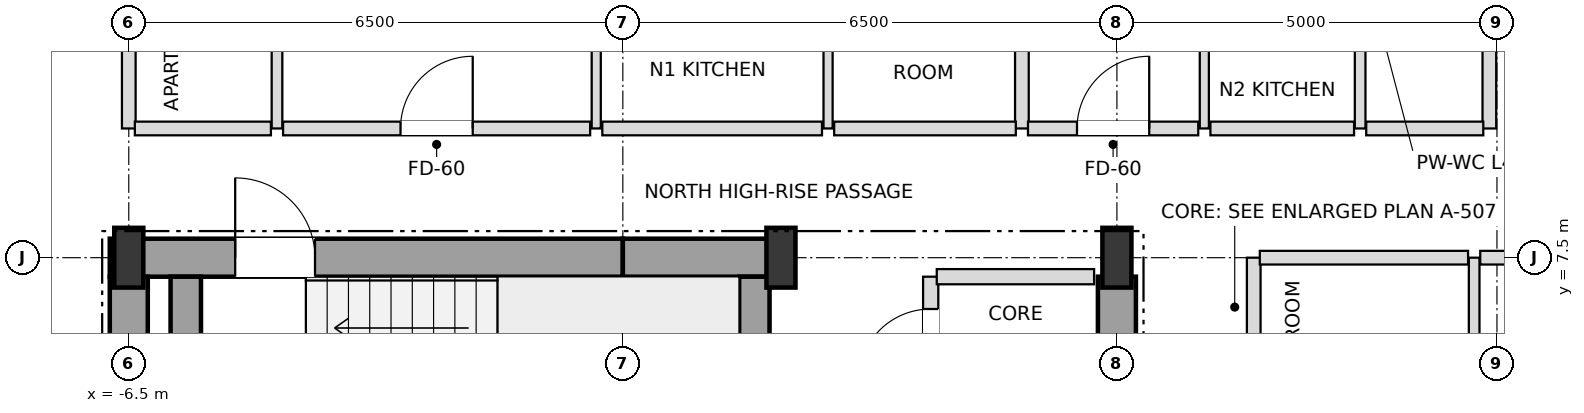
"""IFC4 building model, lengths in metres.
Left out: names, types, materials, properties, quantities, classifications, styles, units other than length and angle.
Written with IfcOpenShell. Run it as: python <this file> out.ifc"""

import sys

from ifc_helpers import new_model, si_unit, direction, frame, frame_2d, origin, origin_2d, place, context, subcontext, project, spatial, rectangle, i_section, extrude, element, fill, save


model = new_model("IFC4")
c1 = context("Model", 3, precision=1e-05, world=origin(), true_north=direction((0.0, 1.0)))
c2 = subcontext(c1, "Body", "Model", "MODEL_VIEW")
j1 = project(units=[si_unit("LENGTHUNIT", "METRE"), si_unit("PLANEANGLEUNIT", "RADIAN")], contexts=[c1])
p1 = place(None, origin())
s1 = spatial("IfcSite", under=j1, at=p1, CompositionType="ELEMENT")
p2 = place(p1, origin())
s2 = spatial("IfcBuilding", under=s1, at=p2, CompositionType="ELEMENT")
p3 = place(p2, frame((0.0, 0.0, 279.9)))
s3 = spatial("IfcBuildingStorey", under=s2, at=p3, CompositionType="ELEMENT", Elevation=279.9)
for number, where, z_axis, x_axis in (
    (1, (-6.5, 7.5, 0.0), (0.0, 0.0, 1.0), (1.0, 0.0, 0.0)),
    (2, (2.08, 7.5, 0.0), (0.0, 0.0, 1.0), (1.0, 0.0, 0.0)),
    (3, (6.5, 7.5, 0.0), (0.0, 0.0, 1.0), (1.0, 0.0, 0.0)),
):
    element("IfcColumn", number, at=place(p3, frame(where, z_axis=z_axis, x_axis=x_axis)), inside=s3, PredefinedType="COLUMN", context=c2, shape_type="SweptSolid", body=[
        extrude(i_section(OverallWidth=0.382, OverallDepth=0.786, WebThickness=0.02, FlangeThickness=0.033, at=origin_2d()), origin(), (0.0, 0.0, 1.0), 3.6),
    ])
p4 = place(p3, frame((-6.75, 7.5, 0.0), z_axis=(0.0, 0.0, 1.0), x_axis=(1.0, 0.0, 0.0)))
e4 = element("IfcWall", 4, at=p4, inside=s3, PredefinedType="SHEAR", context=c2, shape_type="SweptSolid", body=[
    extrude(rectangle(XDim=6.75, YDim=0.5, at=frame_2d((3.375, 0.0))), origin(), (0.0, 0.0, 1.0), 3.38),
])
p5 = place(p4, frame((1.65, 0.0, 0.0)))
e5 = element("IfcOpeningElement", 5, at=p5, cuts=e4, PredefinedType="OPENING", context=c2, shape_type="SweptSolid", body=[
    extrude(rectangle(XDim=1.05, YDim=2.15, at=frame_2d((0.525, 1.075))), frame((0.0, 0.26, 0.0), z_axis=(0.0, -1.0, 0.0), x_axis=(1.0, 0.0, 0.0)), (0.0, 0.0, 1.0), 0.52),
])
p6 = place(p3, frame((0.0, 7.5, 0.0), z_axis=(0.0, 0.0, 1.0), x_axis=(1.0, 0.0, 0.0)))
e6 = element("IfcWall", 6, at=p6, inside=s3, PredefinedType="SHEAR", context=c2, shape_type="SweptSolid", body=[
    extrude(rectangle(XDim=2.08, YDim=0.5, at=frame_2d((1.04, 0.0))), origin(), (0.0, 0.0, 1.0), 3.38),
])
for number, where, z_axis, x_axis in (
    (7, (-6.5, 3.95, 0.0), (0.0, 0.0, 1.0), (0.0, 1.0, 0.0)),
    (8, (6.5, 3.95, 0.0), (0.0, 0.0, 1.0), (0.0, 1.0, 0.0)),
):
    element("IfcWall", number, at=place(p3, frame(where, z_axis=z_axis, x_axis=x_axis)), inside=s3, PredefinedType="SHEAR", context=c2, shape_type="SweptSolid", body=[
        extrude(rectangle(XDim=3.3, YDim=0.5, at=frame_2d((1.65, 0.0))), origin(), (0.0, 0.0, 1.0), 3.38),
    ])
for number, where, z_axis, x_axis in (
    (9, (1.73, 3.95, 0.0), (0.0, 0.0, 1.0), (0.0, 1.0, 0.0)),
    (10, (-5.75, 3.95, 0.0), (0.0, 0.0, 1.0), (0.0, 1.0, 0.0)),
):
    element("IfcWall", number, at=place(p3, frame(where, z_axis=z_axis, x_axis=x_axis)), inside=s3, PredefinedType="SHEAR", context=c2, shape_type="SweptSolid", body=[
        extrude(rectangle(XDim=3.3, YDim=0.4, at=frame_2d((1.65, 0.0))), origin(), (0.0, 0.0, 1.0), 3.38),
    ])
p7 = place(p3, frame((-6.5, 9.2, 0.0), z_axis=(0.0, 0.0, 1.0), x_axis=(0.0, 1.0, 0.0)))
e11 = element("IfcWall", 11, at=p7, inside=s3, PredefinedType="PARTITIONING", context=c2, shape_type="SweptSolid", body=[
    extrude(rectangle(XDim=10.7, YDim=0.18, at=frame_2d((5.35, 0.0))), origin(), (0.0, 0.0, 1.0), 2.826),
])
p8 = place(p3, frame((-4.55, 9.2, 0.0), z_axis=(0.0, 0.0, 1.0), x_axis=(0.0, 1.0, 0.0)))
e12 = element("IfcWall", 12, at=p8, inside=s3, PredefinedType="PARTITIONING", context=c2, shape_type="SweptSolid", body=[
    extrude(rectangle(XDim=4.7, YDim=0.14, at=frame_2d((2.35, 0.0))), origin(), (0.0, 0.0, 1.0), 3.38),
])
p9 = place(p8, frame((1.9, 0.0, 0.0)))
e13 = element("IfcOpeningElement", 13, at=p9, cuts=e12, PredefinedType="OPENING", context=c2, shape_type="SweptSolid", body=[
    extrude(rectangle(XDim=0.9, YDim=2.1, at=frame_2d((0.45, 1.05))), frame((0.0, 0.08, 0.0), z_axis=(0.0, -1.0, 0.0), x_axis=(1.0, 0.0, 0.0)), (0.0, 0.0, 1.0), 0.16),
])
p10 = place(p3, frame((-0.35, 9.2, 0.0), z_axis=(0.0, 0.0, 1.0), x_axis=(0.0, 1.0, 0.0)))
e14 = element("IfcWall", 14, at=p10, inside=s3, PredefinedType="PARTITIONING", context=c2, shape_type="SweptSolid", body=[
    extrude(rectangle(XDim=4.7, YDim=0.12, at=frame_2d((2.35, 0.0))), origin(), (0.0, 0.0, 1.0), 3.38),
])
p11 = place(p10, frame((1.875, 0.0, 0.0)))
e15 = element("IfcOpeningElement", 15, at=p11, cuts=e14, PredefinedType="OPENING", context=c2, shape_type="SweptSolid", body=[
    extrude(rectangle(XDim=0.95, YDim=2.1, at=frame_2d((0.475, 1.05))), frame((0.0, 0.07, 0.0), z_axis=(0.0, -1.0, 0.0), x_axis=(1.0, 0.0, 0.0)), (0.0, 0.0, 1.0), 0.14),
])
p12 = place(p3, frame((2.7, 9.2, 0.0), z_axis=(0.0, 0.0, 1.0), x_axis=(0.0, 1.0, 0.0)))
e16 = element("IfcWall", 16, at=p12, inside=s3, PredefinedType="PARTITIONING", context=c2, shape_type="SweptSolid", body=[
    extrude(rectangle(XDim=4.7, YDim=0.12, at=frame_2d((2.35, 0.0))), origin(), (0.0, 0.0, 1.0), 3.38),
])
p13 = place(p12, frame((1.9, 0.0, 0.0)))
e17 = element("IfcOpeningElement", 17, at=p13, cuts=e16, PredefinedType="OPENING", context=c2, shape_type="SweptSolid", body=[
    extrude(rectangle(XDim=0.9, YDim=2.1, at=frame_2d((0.45, 1.05))), frame((0.0, 0.07, 0.0), z_axis=(0.0, -1.0, 0.0), x_axis=(1.0, 0.0, 0.0)), (0.0, 0.0, 1.0), 0.14),
])
p14 = place(p3, frame((4.05, 5.55, 0.0), z_axis=(0.0, 0.0, 1.0), x_axis=(0.0, 1.0, 0.0)))
e18 = element("IfcWall", 18, at=p14, inside=s3, PredefinedType="SOLIDWALL", context=c2, shape_type="SweptSolid", body=[
    extrude(rectangle(XDim=1.7, YDim=0.2, at=frame_2d((0.85, 0.0))), origin(), (0.0, 0.0, 1.0), 3.38),
])
p15 = place(p14, frame((0.325, 0.0, 0.0)))
e19 = element("IfcOpeningElement", 19, at=p15, cuts=e18, PredefinedType="OPENING", context=c2, shape_type="SweptSolid", body=[
    extrude(rectangle(XDim=0.95, YDim=2.15, at=frame_2d((0.475, 1.075))), frame((0.0, 0.11, 0.0), z_axis=(0.0, -1.0, 0.0), x_axis=(1.0, 0.0, 0.0)), (0.0, 0.0, 1.0), 0.22),
])
p16 = place(p3, frame((5.25, 9.2, 0.0), z_axis=(0.0, 0.0, 1.0), x_axis=(0.0, 1.0, 0.0)))
e20 = element("IfcWall", 20, at=p16, inside=s3, PredefinedType="PARTITIONING", context=c2, shape_type="SweptSolid", body=[
    extrude(rectangle(XDim=10.7, YDim=0.18, at=frame_2d((5.35, 0.0))), origin(), (0.0, 0.0, 1.0), 3.018),
])
p17 = place(p3, frame((7.65, 9.2, 0.0), z_axis=(0.0, 0.0, 1.0), x_axis=(0.0, 1.0, 0.0)))
e21 = element("IfcWall", 21, at=p17, inside=s3, PredefinedType="PARTITIONING", context=c2, shape_type="SweptSolid", body=[
    extrude(rectangle(XDim=4.7, YDim=0.12, at=frame_2d((2.35, 0.0))), origin(), (0.0, 0.0, 1.0), 2.826),
])
p18 = place(p17, frame((1.875, 0.0, 0.0)))
e22 = element("IfcOpeningElement", 22, at=p18, cuts=e21, PredefinedType="OPENING", context=c2, shape_type="SweptSolid", body=[
    extrude(rectangle(XDim=0.95, YDim=2.1, at=frame_2d((0.475, 1.05))), frame((0.0, 0.07, 0.0), z_axis=(0.0, -1.0, 0.0), x_axis=(1.0, 0.0, 0.0)), (0.0, 0.0, 1.0), 0.14),
])
p19 = place(p3, frame((8.3, -7.5, 0.0), z_axis=(0.0, 0.0, 1.0), x_axis=(0.0, 1.0, 0.0)))
e23 = element("IfcWall", 23, at=p19, inside=s3, PredefinedType="PARTITIONING", context=c2, shape_type="SweptSolid", body=[
    extrude(rectangle(XDim=15.0, YDim=0.18, at=frame_2d((7.5, 0.0))), origin(), (0.0, 0.0, 1.0), 3.38),
])
p20 = place(p19, frame((2.355, 0.0, 0.0)))
e24 = element("IfcOpeningElement", 24, at=p20, cuts=e23, PredefinedType="OPENING", context=c2, shape_type="SweptSolid", body=[
    extrude(rectangle(XDim=0.95, YDim=2.15, at=frame_2d((0.475, 1.075))), frame((0.0, 0.1, 0.0), z_axis=(0.0, -1.0, 0.0), x_axis=(1.0, 0.0, 0.0)), (0.0, 0.0, 1.0), 0.2),
])
p21 = place(p3, frame((9.7, 9.2, 0.0), z_axis=(0.0, 0.0, 1.0), x_axis=(0.0, 1.0, 0.0)))
e25 = element("IfcWall", 25, at=p21, inside=s3, PredefinedType="PARTITIONING", context=c2, shape_type="SweptSolid", body=[
    extrude(rectangle(XDim=4.7, YDim=0.14, at=frame_2d((2.35, 0.0))), origin(), (0.0, 0.0, 1.0), 2.826),
])
p22 = place(p21, frame((1.9, 0.0, 0.0)))
e26 = element("IfcOpeningElement", 26, at=p22, cuts=e25, PredefinedType="OPENING", context=c2, shape_type="SweptSolid", body=[
    extrude(rectangle(XDim=0.9, YDim=2.1, at=frame_2d((0.45, 1.05))), frame((0.0, 0.08, 0.0), z_axis=(0.0, -1.0, 0.0), x_axis=(1.0, 0.0, 0.0)), (0.0, 0.0, 1.0), 0.16),
])
p23 = place(p3, frame((11.2, -7.5, 0.0), z_axis=(0.0, 0.0, 1.0), x_axis=(0.0, 1.0, 0.0)))
e27 = element("IfcWall", 27, at=p23, inside=s3, PredefinedType="PARTITIONING", context=c2, shape_type="SweptSolid", body=[
    extrude(rectangle(XDim=15.0, YDim=0.14, at=frame_2d((7.5, 0.0))), origin(), (0.0, 0.0, 1.0), 3.38),
])
p24 = place(p23, frame((3.475, 0.0, 0.0)))
e28 = element("IfcOpeningElement", 28, at=p24, cuts=e27, PredefinedType="OPENING", context=c2, shape_type="SweptSolid", body=[
    extrude(rectangle(XDim=0.95, YDim=2.1, at=frame_2d((0.475, 1.05))), frame((0.0, 0.08, 0.0), z_axis=(0.0, -1.0, 0.0), x_axis=(1.0, 0.0, 0.0)), (0.0, 0.0, 1.0), 0.16),
])
p25 = place(p3, frame((11.4, 9.2, 0.0), z_axis=(0.0, 0.0, 1.0), x_axis=(0.0, 1.0, 0.0)))
e29 = element("IfcWall", 29, at=p25, inside=s3, PredefinedType="PARTITIONING", context=c2, shape_type="SweptSolid", body=[
    extrude(rectangle(XDim=5.07, YDim=0.18, at=frame_2d((2.535, 0.0))), origin(), (0.0, 0.0, 1.0), 2.748),
])
p26 = place(p3, frame((4.13, 7.25, 0.0), z_axis=(0.0, 0.0, 1.0), x_axis=(1.0, 0.0, 0.0)))
e30 = element("IfcWall", 30, at=p26, inside=s3, PredefinedType="SOLIDWALL", context=c2, shape_type="SweptSolid", body=[
    extrude(rectangle(XDim=2.07, YDim=0.2, at=frame_2d((1.035, 0.0))), origin(), (0.0, 0.0, 1.0), 3.38),
])
p27 = place(p3, frame((8.38, 7.5, 0.0), z_axis=(0.0, 0.0, 1.0), x_axis=(1.0, 0.0, 0.0)))
e31 = element("IfcWall", 31, at=p27, inside=s3, PredefinedType="PARTITIONING", context=c2, shape_type="SweptSolid", body=[
    extrude(rectangle(XDim=2.74, YDim=0.18, at=frame_2d((1.37, 0.0))), origin(), (0.0, 0.0, 1.0), 2.826),
])
p28 = place(p3, frame((11.28, 7.5, 0.0), z_axis=(0.0, 0.0, 1.0), x_axis=(1.0, 0.0, 0.0)))
e32 = element("IfcWall", 32, at=p28, inside=s3, PredefinedType="PARTITIONING", context=c2, shape_type="SweptSolid", body=[
    extrude(rectangle(XDim=5.62, YDim=0.18, at=frame_2d((2.81, 0.0))), origin(), (0.0, 0.0, 1.0), 2.826),
])
p29 = place(p3, frame((-6.42, 9.2, 0.0), z_axis=(0.0, 0.0, 1.0), x_axis=(1.0, 0.0, 0.0)))
e33 = element("IfcWall", 33, at=p29, inside=s3, PredefinedType="PARTITIONING", context=c2, shape_type="SweptSolid", body=[
    extrude(rectangle(XDim=1.79, YDim=0.18, at=frame_2d((0.895, 0.0))), origin(), (0.0, 0.0, 1.0), 3.38),
])
p30 = place(p3, frame((-4.47, 9.2, 0.0), z_axis=(0.0, 0.0, 1.0), x_axis=(1.0, 0.0, 0.0)))
e34 = element("IfcWall", 34, at=p30, inside=s3, PredefinedType="PARTITIONING", context=c2, shape_type="SweptSolid", body=[
    extrude(rectangle(XDim=4.04, YDim=0.18, at=frame_2d((2.02, 0.0))), origin(), (0.0, 0.0, 1.0), 3.38),
])
p31 = place(p30, frame((1.545, 0.0, 0.0)))
e35 = element("IfcOpeningElement", 35, at=p31, cuts=e34, PredefinedType="OPENING", context=c2, shape_type="SweptSolid", body=[
    extrude(rectangle(XDim=0.95, YDim=2.15, at=frame_2d((0.475, 1.075))), frame((0.0, 0.1, 0.0), z_axis=(0.0, -1.0, 0.0), x_axis=(1.0, 0.0, 0.0)), (0.0, 0.0, 1.0), 0.2),
])
p32 = place(p3, frame((-0.27, 9.2, 0.0), z_axis=(0.0, 0.0, 1.0), x_axis=(1.0, 0.0, 0.0)))
e36 = element("IfcWall", 36, at=p32, inside=s3, PredefinedType="PARTITIONING", context=c2, shape_type="SweptSolid", body=[
    extrude(rectangle(XDim=2.89, YDim=0.18, at=frame_2d((1.445, 0.0))), origin(), (0.0, 0.0, 1.0), 3.38),
])
p33 = place(p3, frame((2.78, 9.2, 0.0), z_axis=(0.0, 0.0, 1.0), x_axis=(1.0, 0.0, 0.0)))
e37 = element("IfcWall", 37, at=p33, inside=s3, PredefinedType="PARTITIONING", context=c2, shape_type="SweptSolid", body=[
    extrude(rectangle(XDim=2.39, YDim=0.18, at=frame_2d((1.195, 0.0))), origin(), (0.0, 0.0, 1.0), 3.38),
])
p34 = place(p3, frame((5.33, 9.2, 0.0), z_axis=(0.0, 0.0, 1.0), x_axis=(1.0, 0.0, 0.0)))
e38 = element("IfcWall", 38, at=p34, inside=s3, PredefinedType="PARTITIONING", context=c2, shape_type="SweptSolid", body=[
    extrude(rectangle(XDim=2.24, YDim=0.18, at=frame_2d((1.12, 0.0))), origin(), (0.0, 0.0, 1.0), 2.826),
])
p35 = place(p34, frame((0.645, 0.0, 0.0)))
e39 = element("IfcOpeningElement", 39, at=p35, cuts=e38, PredefinedType="OPENING", context=c2, shape_type="SweptSolid", body=[
    extrude(rectangle(XDim=0.95, YDim=2.15, at=frame_2d((0.475, 1.075))), frame((0.0, 0.1, 0.0), z_axis=(0.0, -1.0, 0.0), x_axis=(1.0, 0.0, 0.0)), (0.0, 0.0, 1.0), 0.2),
])
p36 = place(p3, frame((7.73, 9.2, 0.0), z_axis=(0.0, 0.0, 1.0), x_axis=(1.0, 0.0, 0.0)))
e40 = element("IfcWall", 40, at=p36, inside=s3, PredefinedType="PARTITIONING", context=c2, shape_type="SweptSolid", body=[
    extrude(rectangle(XDim=1.89, YDim=0.18, at=frame_2d((0.945, 0.0))), origin(), (0.0, 0.0, 1.0), 3.38),
])
p37 = place(p3, frame((9.78, 9.2, 0.0), z_axis=(0.0, 0.0, 1.0), x_axis=(1.0, 0.0, 0.0)))
e41 = element("IfcWall", 41, at=p37, inside=s3, PredefinedType="PARTITIONING", context=c2, shape_type="SweptSolid", body=[
    extrude(rectangle(XDim=1.54, YDim=0.18, at=frame_2d((0.77, 0.0))), origin(), (0.0, 0.0, 1.0), 3.38),
])
p38 = place(p5, origin())
e42 = element("IfcDoor", 42, at=p38, inside=s3, OperationType="SINGLE_SWING_LEFT", PredefinedType="DOOR", context=c2, shape_type="SweptSolid", body=[
    extrude(rectangle(XDim=1.05, YDim=2.15, at=frame_2d((0.525, 1.075))), frame((0.0, 0.025, 0.0), z_axis=(0.0, -1.0, 0.0), x_axis=(1.0, 0.0, 0.0)), (0.0, 0.0, 1.0), 0.05),
])
fill(e5, e42)
p39 = place(p15, origin())
e43 = element("IfcDoor", 43, at=p39, inside=s3, OperationType="SINGLE_SWING_LEFT", PredefinedType="DOOR", context=c2, shape_type="SweptSolid", body=[
    extrude(rectangle(XDim=0.95, YDim=2.15, at=frame_2d((0.475, 1.075))), frame((0.0, 0.025, 0.0), z_axis=(0.0, -1.0, 0.0), x_axis=(1.0, 0.0, 0.0)), (0.0, 0.0, 1.0), 0.05),
])
fill(e19, e43)
p40 = place(p31, origin())
e44 = element("IfcDoor", 44, at=p40, inside=s3, OperationType="SINGLE_SWING_RIGHT", PredefinedType="DOOR", context=c2, shape_type="SweptSolid", body=[
    extrude(rectangle(XDim=0.95, YDim=2.15, at=frame_2d((0.475, 1.075))), frame((0.0, 0.025, 0.0), z_axis=(0.0, -1.0, 0.0), x_axis=(1.0, 0.0, 0.0)), (0.0, 0.0, 1.0), 0.05),
])
fill(e35, e44)
p41 = place(p35, origin())
e45 = element("IfcDoor", 45, at=p41, inside=s3, OperationType="SINGLE_SWING_RIGHT", PredefinedType="DOOR", context=c2, shape_type="SweptSolid", body=[
    extrude(rectangle(XDim=0.95, YDim=2.15, at=frame_2d((0.475, 1.075))), frame((0.0, 0.025, 0.0), z_axis=(0.0, -1.0, 0.0), x_axis=(1.0, 0.0, 0.0)), (0.0, 0.0, 1.0), 0.05),
])
fill(e39, e45)
save(model, sys.argv[1])
